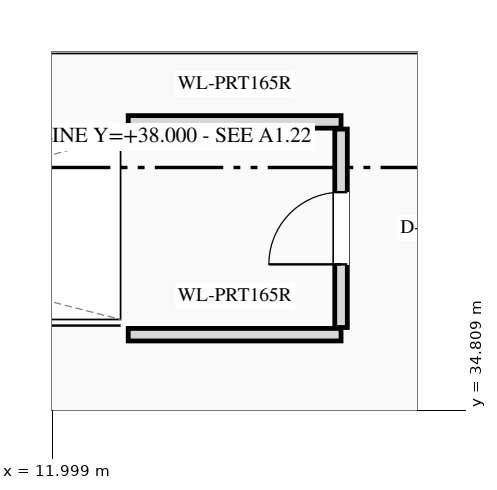
"""IFC4 building model, lengths in metres.
Left out: names, types, materials, properties, quantities, classifications, styles, units other than length and angle.
Written with IfcOpenShell. Run it as: python <this file> out.ifc"""

import sys

from ifc_helpers import new_model, si_unit, direction, frame, frame_2d, origin, place, context, subcontext, project, spatial, rectangle, extrude, element, fill, save


model = new_model("IFC4")
c1 = context("Model", 3, precision=1e-05, world=origin(), true_north=direction((0.0, 1.0)))
c2 = subcontext(c1, "Body", "Model", "MODEL_VIEW")
j1 = project(units=[si_unit("LENGTHUNIT", "METRE"), si_unit("PLANEANGLEUNIT", "RADIAN")], contexts=[c1])
p1 = place(None, origin())
s1 = spatial("IfcSite", under=j1, at=p1, CompositionType="ELEMENT")
p2 = place(p1, origin())
s2 = spatial("IfcBuilding", under=s1, at=p2, CompositionType="ELEMENT")
p3 = place(p2, frame((0.0, 0.0, 5.4)))
s3 = spatial("IfcBuildingStorey", under=s2, at=p3, CompositionType="ELEMENT", Elevation=5.4)
for number, where, z_axis, x_axis in (
    (1, (13.0, 35.8, 0.0), (0.0, 0.0, 1.0), (1.0, 0.0, 0.0)),
    (2, (13.0, 38.6, 0.0), (0.0, 0.0, 1.0), (1.0, 0.0, 0.0)),
):
    element("IfcWall", number, at=place(p3, frame(where, z_axis=z_axis, x_axis=x_axis)), inside=s3, PredefinedType="PARTITIONING", context=c2, shape_type="SweptSolid", body=[
        extrude(rectangle(XDim=2.8, YDim=0.165, at=frame_2d((1.4, 0.0))), origin(), (0.0, 0.0, 1.0), 5.095),
    ])
p4 = place(p3, frame((15.8, 35.895, 0.0), z_axis=(0.0, 0.0, 1.0), x_axis=(0.0, 1.0, 0.0)))
e3 = element("IfcWall", 3, at=p4, inside=s3, PredefinedType="PARTITIONING", context=c2, shape_type="SweptSolid", body=[
    extrude(rectangle(XDim=2.611, YDim=0.165, at=frame_2d((1.306, 0.0))), origin(), (0.0, 0.0, 1.0), 4.703),
])
p5 = place(p4, frame((0.831, 0.0, 0.0)))
e4 = element("IfcOpeningElement", 4, at=p5, cuts=e3, PredefinedType="OPENING", context=c2, shape_type="SweptSolid", body=[
    extrude(rectangle(XDim=0.95, YDim=2.15, at=frame_2d((0.475, 1.075))), frame((0.0, 0.093, 0.0), z_axis=(0.0, -1.0, 0.0), x_axis=(1.0, 0.0, 0.0)), (0.0, 0.0, 1.0), 0.185),
])
p6 = place(p5, origin())
e5 = element("IfcDoor", 5, at=p6, inside=s3, OperationType="SINGLE_SWING_LEFT", PredefinedType="DOOR", context=c2, shape_type="SweptSolid", body=[
    extrude(rectangle(XDim=0.95, YDim=2.15, at=frame_2d((0.475, 1.075))), frame((0.0, 0.025, 0.0), z_axis=(0.0, -1.0, 0.0), x_axis=(1.0, 0.0, 0.0)), (0.0, 0.0, 1.0), 0.05),
])
fill(e4, e5)
save(model, sys.argv[1])
